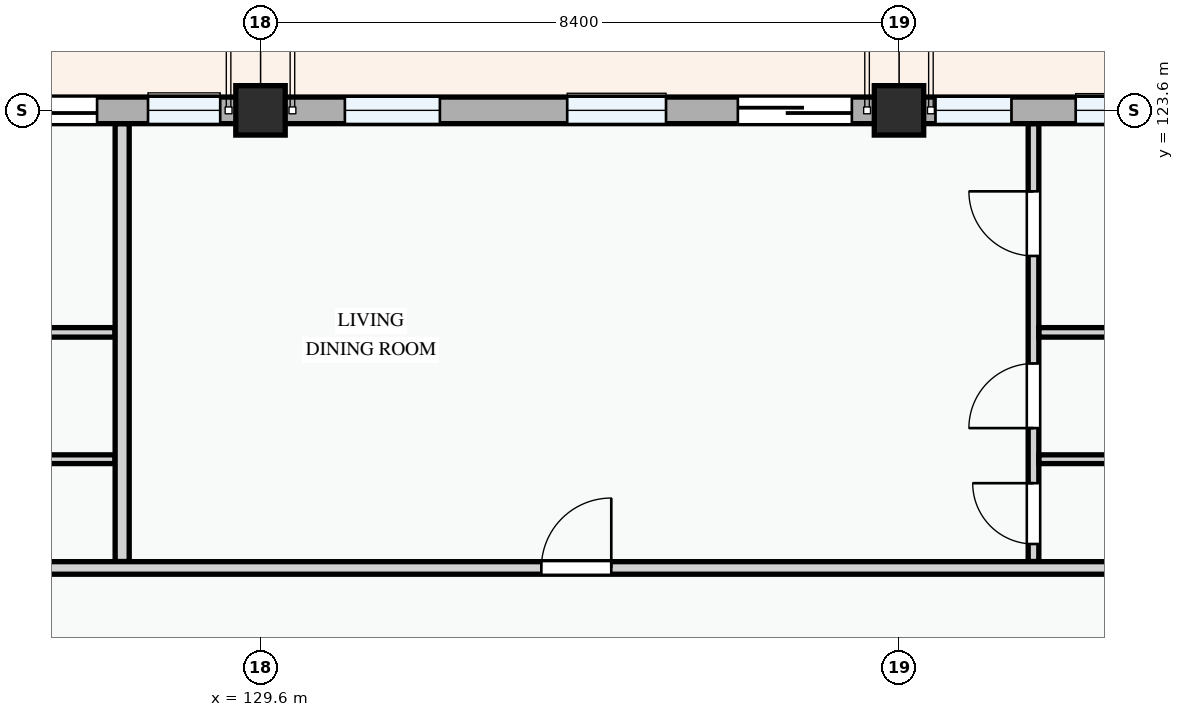
"""IFC4 building model, lengths in metres.
Left out: names, types, materials, properties, quantities, classifications, styles, units other than length and angle.
Written with IfcOpenShell. Run it as: python <this file> out.ifc"""

import sys

from ifc_helpers import new_model, si_unit, direction, frame, frame_2d, origin, origin_2d, place, context, subcontext, project, spatial, rectangle, extrude, element, fill, save


model = new_model("IFC4")
c1 = context("Model", 3, precision=1e-05, world=origin(), true_north=direction((0.0, 1.0)))
c2 = subcontext(c1, "Body", "Model", "MODEL_VIEW")
j1 = project(units=[si_unit("LENGTHUNIT", "METRE"), si_unit("PLANEANGLEUNIT", "RADIAN")], contexts=[c1])
p1 = place(None, origin())
s1 = spatial("IfcSite", under=j1, at=p1, CompositionType="ELEMENT")
p2 = place(p1, origin())
s2 = spatial("IfcBuilding", under=s1, at=p2, CompositionType="ELEMENT")
p3 = place(p2, frame((0.0, 0.0, 11.4)))
s3 = spatial("IfcBuildingStorey", under=s2, at=p3, CompositionType="ELEMENT", Elevation=11.4)
for number, where, z_axis, x_axis in (
    (1, (129.6, 123.6, 0.0), (0.0, 0.0, 1.0), (1.0, 0.0, 0.0)),
    (2, (138.0, 123.6, 0.0), (0.0, 0.0, 1.0), (1.0, 0.0, 0.0)),
):
    element("IfcColumn", number, at=place(p3, frame(where, z_axis=z_axis, x_axis=x_axis)), inside=s3, PredefinedType="COLUMN", context=c2, shape_type="SweptSolid", body=[
        extrude(rectangle(XDim=0.65, YDim=0.65, at=origin_2d()), origin(), (0.0, 0.0, 1.0), 3.3),
    ])
p4 = place(p3, frame((144.0, 123.6, 0.0), z_axis=(0.0, 0.0, 1.0), x_axis=(-1.0, 0.0, 0.0)))
e3 = element("IfcWall", 3, at=p4, inside=s3, PredefinedType="STANDARD", context=c2, shape_type="SweptSolid", body=[
    extrude(rectangle(XDim=6.0, YDim=0.35, at=frame_2d((3.0, 0.0))), origin(), (0.0, 0.0, 1.0), 2.475),
])
p5 = place(p4, frame((0.62, 0.0, 0.0)))
e4 = element("IfcOpeningElement", 4, at=p5, cuts=e3, PredefinedType="OPENING", context=c2, shape_type="SweptSolid", body=[
    extrude(rectangle(XDim=1.4, YDim=2.2, at=frame_2d((0.7, 1.1))), frame((0.0, 0.185, 0.0), z_axis=(0.0, -1.0, 0.0), x_axis=(1.0, 0.0, 0.0)), (0.0, 0.0, 1.0), 0.37),
])
p6 = place(p4, frame((2.625, 0.0, 0.78)))
e5 = element("IfcOpeningElement", 5, at=p6, cuts=e3, PredefinedType="OPENING", context=c2, shape_type="SweptSolid", body=[
    extrude(rectangle(XDim=1.05, YDim=1.2, at=frame_2d((0.525, 0.6))), frame((0.0, 0.185, 0.0), z_axis=(0.0, -1.0, 0.0), x_axis=(1.0, 0.0, 0.0)), (0.0, 0.0, 1.0), 0.37),
])
p7 = place(p4, frame((4.52, 0.0, 0.78)))
e6 = element("IfcOpeningElement", 6, at=p7, cuts=e3, PredefinedType="OPENING", context=c2, shape_type="SweptSolid", body=[
    extrude(rectangle(XDim=1.0, YDim=1.25, at=frame_2d((0.5, 0.625))), frame((0.0, 0.185, 0.0), z_axis=(0.0, -1.0, 0.0), x_axis=(1.0, 0.0, 0.0)), (0.0, 0.0, 1.0), 0.37),
])
p8 = place(p3, frame((138.0, 123.6, 0.0), z_axis=(0.0, 0.0, 1.0), x_axis=(-1.0, 0.0, 0.0)))
e7 = element("IfcWall", 7, at=p8, inside=s3, PredefinedType="STANDARD", context=c2, shape_type="SweptSolid", body=[
    extrude(rectangle(XDim=8.4, YDim=0.35, at=frame_2d((4.2, 0.0))), origin(), (0.0, 0.0, 1.0), 2.375),
])
p9 = place(p8, frame((0.62, 0.0, 0.0)))
e8 = element("IfcOpeningElement", 8, at=p9, cuts=e7, PredefinedType="OPENING", context=c2, shape_type="SweptSolid", body=[
    extrude(rectangle(XDim=1.5, YDim=2.2, at=frame_2d((0.75, 1.1))), frame((0.0, 0.185, 0.0), z_axis=(0.0, -1.0, 0.0), x_axis=(1.0, 0.0, 0.0)), (0.0, 0.0, 1.0), 0.37),
])
p10 = place(p8, frame((3.065, 0.0, 0.78)))
e9 = element("IfcOpeningElement", 9, at=p10, cuts=e7, PredefinedType="OPENING", context=c2, shape_type="SweptSolid", body=[
    extrude(rectangle(XDim=1.3, YDim=1.4, at=frame_2d((0.65, 0.7))), frame((0.0, 0.185, 0.0), z_axis=(0.0, -1.0, 0.0), x_axis=(1.0, 0.0, 0.0)), (0.0, 0.0, 1.0), 0.37),
])
p11 = place(p8, frame((6.04, 0.0, 0.78)))
e10 = element("IfcOpeningElement", 10, at=p11, cuts=e7, PredefinedType="OPENING", context=c2, shape_type="SweptSolid", body=[
    extrude(rectangle(XDim=1.25, YDim=1.3, at=frame_2d((0.625, 0.65))), frame((0.0, 0.185, 0.0), z_axis=(0.0, -1.0, 0.0), x_axis=(1.0, 0.0, 0.0)), (0.0, 0.0, 1.0), 0.37),
])
p12 = place(p3, frame((129.6, 123.6, 0.0), z_axis=(0.0, 0.0, 1.0), x_axis=(-1.0, 0.0, 0.0)))
e11 = element("IfcWall", 11, at=p12, inside=s3, PredefinedType="STANDARD", context=c2, shape_type="SweptSolid", body=[
    extrude(rectangle(XDim=6.0, YDim=0.35, at=frame_2d((3.0, 0.0))), origin(), (0.0, 0.0, 1.0), 2.475),
])
p13 = place(p12, frame((2.15, 0.0, 0.0)))
e12 = element("IfcOpeningElement", 12, at=p13, cuts=e11, PredefinedType="OPENING", context=c2, shape_type="SweptSolid", body=[
    extrude(rectangle(XDim=1.6, YDim=2.2, at=frame_2d((0.8, 1.1))), frame((0.0, 0.185, 0.0), z_axis=(0.0, -1.0, 0.0), x_axis=(1.0, 0.0, 0.0)), (0.0, 0.0, 1.0), 0.37),
])
p14 = place(p12, frame((0.53, 0.0, 0.78)))
e13 = element("IfcOpeningElement", 13, at=p14, cuts=e11, PredefinedType="OPENING", context=c2, shape_type="SweptSolid", body=[
    extrude(rectangle(XDim=0.95, YDim=1.15, at=frame_2d((0.475, 0.575))), frame((0.0, 0.185, 0.0), z_axis=(0.0, -1.0, 0.0), x_axis=(1.0, 0.0, 0.0)), (0.0, 0.0, 1.0), 0.37),
])
p15 = place(p12, frame((4.255, 0.0, 0.78)))
e14 = element("IfcOpeningElement", 14, at=p15, cuts=e11, PredefinedType="OPENING", context=c2, shape_type="SweptSolid", body=[
    extrude(rectangle(XDim=1.1, YDim=1.3, at=frame_2d((0.55, 0.65))), frame((0.0, 0.185, 0.0), z_axis=(0.0, -1.0, 0.0), x_axis=(1.0, 0.0, 0.0)), (0.0, 0.0, 1.0), 0.37),
])
p16 = place(p3, frame((117.049, 120.679, 0.0), z_axis=(0.0, 0.0, 1.0), x_axis=(1.0, 0.0, 0.0)))
e15 = element("IfcWall", 15, at=p16, inside=s3, PredefinedType="PARTITIONING", context=c2, shape_type="SweptSolid", body=[
    extrude(rectangle(XDim=10.637, YDim=0.125, at=frame_2d((5.318, 0.0))), origin(), (0.0, 0.0, 1.0), 3.0),
])
p17 = place(p3, frame((117.049, 119.01, 0.0), z_axis=(0.0, 0.0, 1.0), x_axis=(1.0, 0.0, 0.0)))
e16 = element("IfcWall", 16, at=p17, inside=s3, PredefinedType="PARTITIONING", context=c2, shape_type="SweptSolid", body=[
    extrude(rectangle(XDim=10.637, YDim=0.115, at=frame_2d((5.318, 0.0))), origin(), (0.0, 0.0, 1.0), 3.0),
])
p18 = place(p3, frame((139.77, 117.665, 0.0), z_axis=(0.0, 0.0, 1.0), x_axis=(0.0, 1.0, 0.0)))
e17 = element("IfcWall", 17, at=p18, inside=s3, PredefinedType="PARTITIONING", context=c2, shape_type="SweptSolid", body=[
    extrude(rectangle(XDim=5.759, YDim=0.14, at=frame_2d((2.879, 0.0))), origin(), (0.0, 0.0, 1.0), 3.0),
])
p19 = place(p18, frame((0.231, 0.0, 0.0)))
e18 = element("IfcOpeningElement", 18, at=p19, cuts=e17, PredefinedType="OPENING", context=c2, shape_type="SweptSolid", body=[
    extrude(rectangle(XDim=0.8, YDim=2.1, at=frame_2d((0.4, 1.05))), frame((0.0, 0.08, 0.0), z_axis=(0.0, -1.0, 0.0), x_axis=(1.0, 0.0, 0.0)), (0.0, 0.0, 1.0), 0.16),
])
p20 = place(p18, frame((1.755, 0.0, 0.0)))
e19 = element("IfcOpeningElement", 19, at=p20, cuts=e17, PredefinedType="OPENING", context=c2, shape_type="SweptSolid", body=[
    extrude(rectangle(XDim=0.85, YDim=2.1, at=frame_2d((0.425, 1.05))), frame((0.0, 0.08, 0.0), z_axis=(0.0, -1.0, 0.0), x_axis=(1.0, 0.0, 0.0)), (0.0, 0.0, 1.0), 0.16),
])
p21 = place(p18, frame((4.02, 0.0, 0.0)))
e20 = element("IfcOpeningElement", 20, at=p21, cuts=e17, PredefinedType="OPENING", context=c2, shape_type="SweptSolid", body=[
    extrude(rectangle(XDim=0.85, YDim=2.1, at=frame_2d((0.425, 1.05))), frame((0.0, 0.08, 0.0), z_axis=(0.0, -1.0, 0.0), x_axis=(1.0, 0.0, 0.0)), (0.0, 0.0, 1.0), 0.16),
])
p22 = place(p3, frame((139.842, 120.679, 0.0), z_axis=(0.0, 0.0, 1.0), x_axis=(1.0, 0.0, 0.0)))
e21 = element("IfcWall", 21, at=p22, inside=s3, PredefinedType="PARTITIONING", context=c2, shape_type="SweptSolid", body=[
    extrude(rectangle(XDim=10.208, YDim=0.125, at=frame_2d((5.104, 0.0))), origin(), (0.0, 0.0, 1.0), 3.0),
])
p23 = place(p3, frame((139.842, 119.01, 0.0), z_axis=(0.0, 0.0, 1.0), x_axis=(1.0, 0.0, 0.0)))
e22 = element("IfcWall", 22, at=p23, inside=s3, PredefinedType="PARTITIONING", context=c2, shape_type="SweptSolid", body=[
    extrude(rectangle(XDim=10.208, YDim=0.115, at=frame_2d((5.104, 0.0))), origin(), (0.0, 0.0, 1.0), 3.0),
])
p24 = place(p3, frame((127.78, 117.665, 0.0), z_axis=(0.0, 0.0, 1.0), x_axis=(0.0, 1.0, 0.0)))
e23 = element("IfcWall", 23, at=p24, inside=s3, PredefinedType="PARTITIONING", context=c2, shape_type="SweptSolid", body=[
    extrude(rectangle(XDim=5.759, YDim=0.185, at=frame_2d((2.879, 0.0))), origin(), (0.0, 0.0, 1.0), 3.0),
])
p25 = place(p3, frame((80.577, 117.58, 0.0), z_axis=(0.0, 0.0, 1.0), x_axis=(1.0, 0.0, 0.0)))
e24 = element("IfcWall", 24, at=p25, inside=s3, PredefinedType="PARTITIONING", context=c2, shape_type="SweptSolid", body=[
    extrude(rectangle(XDim=71.963, YDim=0.165, at=frame_2d((35.981, 0.0))), origin(), (0.0, 0.0, 1.0), 3.0),
])
p26 = place(p25, frame((9.411, 0.0, 0.0)))
e25 = element("IfcOpeningElement", 25, at=p26, cuts=e24, PredefinedType="OPENING", context=c2, shape_type="SweptSolid", body=[
    extrude(rectangle(XDim=0.96, YDim=2.12, at=frame_2d((0.48, 1.06))), frame((0.0, 0.093, 0.0), z_axis=(0.0, -1.0, 0.0), x_axis=(1.0, 0.0, 0.0)), (0.0, 0.0, 1.0), 0.185),
])
p27 = place(p25, frame((23.793, 0.0, 0.0)))
e26 = element("IfcOpeningElement", 26, at=p27, cuts=e24, PredefinedType="OPENING", context=c2, shape_type="SweptSolid", body=[
    extrude(rectangle(XDim=0.92, YDim=2.1, at=frame_2d((0.46, 1.05))), frame((0.0, 0.093, 0.0), z_axis=(0.0, -1.0, 0.0), x_axis=(1.0, 0.0, 0.0)), (0.0, 0.0, 1.0), 0.185),
])
p28 = place(p25, frame((52.718, 0.0, 0.0)))
e27 = element("IfcOpeningElement", 27, at=p28, cuts=e24, PredefinedType="OPENING", context=c2, shape_type="SweptSolid", body=[
    extrude(rectangle(XDim=0.92, YDim=2.1, at=frame_2d((0.46, 1.05))), frame((0.0, 0.093, 0.0), z_axis=(0.0, -1.0, 0.0), x_axis=(1.0, 0.0, 0.0)), (0.0, 0.0, 1.0), 0.185),
])
p29 = place(p6, origin())
e28 = element("IfcWindow", 28, at=p29, inside=s3, PartitioningType="SINGLE_PANEL", PredefinedType="WINDOW", context=c2, shape_type="SweptSolid", body=[
    extrude(rectangle(XDim=1.05, YDim=1.2, at=frame_2d((0.525, 0.6))), frame((0.0, 0.03, 0.0), z_axis=(0.0, -1.0, 0.0), x_axis=(1.0, 0.0, 0.0)), (0.0, 0.0, 1.0), 0.06),
])
fill(e5, e28)
p30 = place(p7, origin())
e29 = element("IfcWindow", 29, at=p30, inside=s3, PartitioningType="SINGLE_PANEL", PredefinedType="WINDOW", context=c2, shape_type="SweptSolid", body=[
    extrude(rectangle(XDim=1.0, YDim=1.25, at=frame_2d((0.5, 0.625))), frame((0.0, 0.03, 0.0), z_axis=(0.0, -1.0, 0.0), x_axis=(1.0, 0.0, 0.0)), (0.0, 0.0, 1.0), 0.06),
])
fill(e6, e29)
p31 = place(p9, frame((1.5, 0.0, 0.0), z_axis=(0.0, 0.0, 1.0), x_axis=(-1.0, 0.0, 0.0)))
e30 = element("IfcDoor", 30, at=p31, inside=s3, OperationType="SLIDING_TO_RIGHT", PredefinedType="DOOR", context=c2, shape_type="SweptSolid", body=[
    extrude(rectangle(XDim=1.5, YDim=2.2, at=frame_2d((0.75, 1.1))), frame((0.0, 0.025, 0.0), z_axis=(0.0, -1.0, 0.0), x_axis=(1.0, 0.0, 0.0)), (0.0, 0.0, 1.0), 0.05),
])
fill(e8, e30)
p32 = place(p10, origin())
e31 = element("IfcWindow", 31, at=p32, inside=s3, PartitioningType="SINGLE_PANEL", PredefinedType="WINDOW", context=c2, shape_type="SweptSolid", body=[
    extrude(rectangle(XDim=1.3, YDim=1.4, at=frame_2d((0.65, 0.7))), frame((0.0, 0.03, 0.0), z_axis=(0.0, -1.0, 0.0), x_axis=(1.0, 0.0, 0.0)), (0.0, 0.0, 1.0), 0.06),
])
fill(e9, e31)
p33 = place(p11, origin())
e32 = element("IfcWindow", 32, at=p33, inside=s3, PartitioningType="SINGLE_PANEL", PredefinedType="WINDOW", context=c2, shape_type="SweptSolid", body=[
    extrude(rectangle(XDim=1.25, YDim=1.3, at=frame_2d((0.625, 0.65))), frame((0.0, 0.03, 0.0), z_axis=(0.0, -1.0, 0.0), x_axis=(1.0, 0.0, 0.0)), (0.0, 0.0, 1.0), 0.06),
])
fill(e10, e32)
p34 = place(p13, frame((1.6, 0.0, 0.0), z_axis=(0.0, 0.0, 1.0), x_axis=(-1.0, 0.0, 0.0)))
e33 = element("IfcDoor", 33, at=p34, inside=s3, OperationType="SLIDING_TO_LEFT", PredefinedType="DOOR", context=c2, shape_type="SweptSolid", body=[
    extrude(rectangle(XDim=1.6, YDim=2.2, at=frame_2d((0.8, 1.1))), frame((0.0, 0.025, 0.0), z_axis=(0.0, -1.0, 0.0), x_axis=(1.0, 0.0, 0.0)), (0.0, 0.0, 1.0), 0.05),
])
fill(e12, e33)
p35 = place(p14, origin())
e34 = element("IfcWindow", 34, at=p35, inside=s3, PartitioningType="SINGLE_PANEL", PredefinedType="WINDOW", context=c2, shape_type="SweptSolid", body=[
    extrude(rectangle(XDim=0.95, YDim=1.15, at=frame_2d((0.475, 0.575))), frame((0.0, 0.03, 0.0), z_axis=(0.0, -1.0, 0.0), x_axis=(1.0, 0.0, 0.0)), (0.0, 0.0, 1.0), 0.06),
])
fill(e13, e34)
p36 = place(p19, origin())
e35 = element("IfcDoor", 35, at=p36, inside=s3, OperationType="SINGLE_SWING_RIGHT", PredefinedType="DOOR", context=c2, shape_type="SweptSolid", body=[
    extrude(rectangle(XDim=0.8, YDim=2.1, at=frame_2d((0.4, 1.05))), frame((0.0, 0.025, 0.0), z_axis=(0.0, -1.0, 0.0), x_axis=(1.0, 0.0, 0.0)), (0.0, 0.0, 1.0), 0.05),
])
fill(e18, e35)
p37 = place(p20, origin())
e36 = element("IfcDoor", 36, at=p37, inside=s3, OperationType="SINGLE_SWING_LEFT", PredefinedType="DOOR", context=c2, shape_type="SweptSolid", body=[
    extrude(rectangle(XDim=0.85, YDim=2.1, at=frame_2d((0.425, 1.05))), frame((0.0, 0.025, 0.0), z_axis=(0.0, -1.0, 0.0), x_axis=(1.0, 0.0, 0.0)), (0.0, 0.0, 1.0), 0.05),
])
fill(e19, e36)
p38 = place(p21, origin())
e37 = element("IfcDoor", 37, at=p38, inside=s3, OperationType="SINGLE_SWING_RIGHT", PredefinedType="DOOR", context=c2, shape_type="SweptSolid", body=[
    extrude(rectangle(XDim=0.85, YDim=2.1, at=frame_2d((0.425, 1.05))), frame((0.0, 0.025, 0.0), z_axis=(0.0, -1.0, 0.0), x_axis=(1.0, 0.0, 0.0)), (0.0, 0.0, 1.0), 0.05),
])
fill(e20, e37)
p39 = place(p28, origin())
e38 = element("IfcDoor", 38, at=p39, inside=s3, OperationType="SINGLE_SWING_RIGHT", PredefinedType="DOOR", context=c2, shape_type="SweptSolid", body=[
    extrude(rectangle(XDim=0.92, YDim=2.1, at=frame_2d((0.46, 1.05))), frame((0.0, 0.025, 0.0), z_axis=(0.0, -1.0, 0.0), x_axis=(1.0, 0.0, 0.0)), (0.0, 0.0, 1.0), 0.05),
])
fill(e27, e38)
save(model, sys.argv[1])
